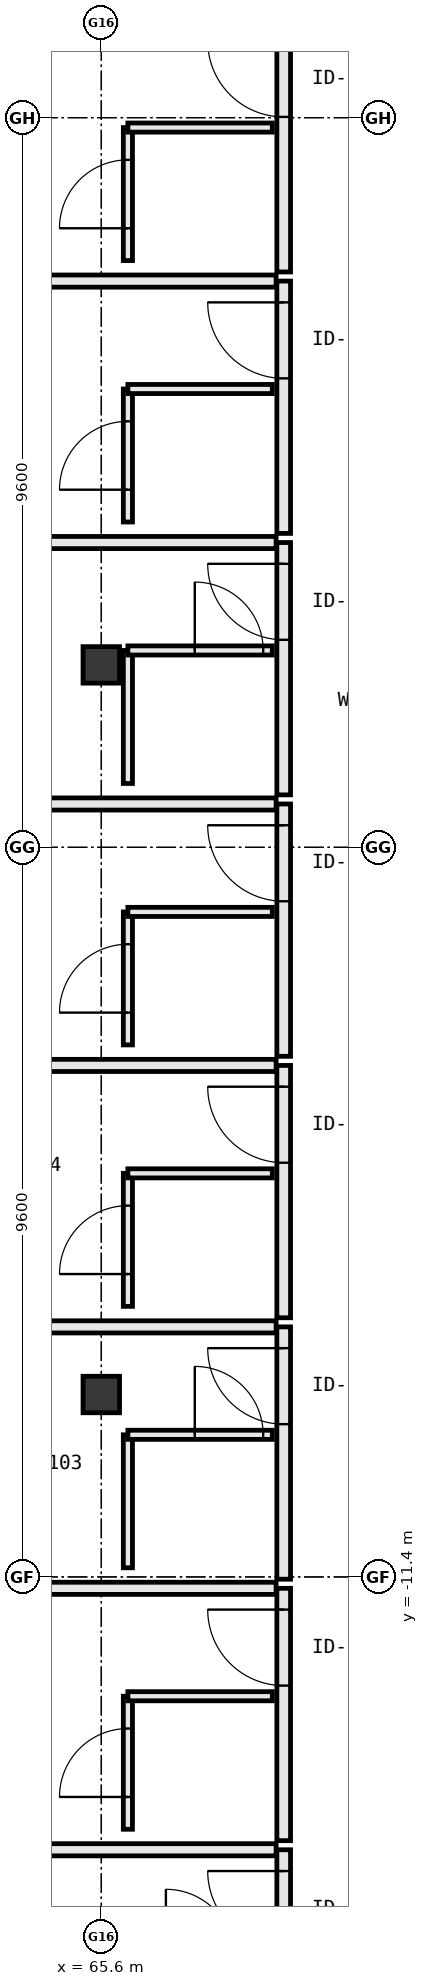
"""IFC4 building model, lengths in metres.
Left out: names, types, materials, properties, quantities, classifications, styles, units other than length and angle.
Written with IfcOpenShell. Run it as: python <this file> out.ifc"""

import sys

from ifc_helpers import new_model, si_unit, direction, frame, frame_2d, origin, origin_2d, place, context, subcontext, project, spatial, rectangle, extrude, element, fill, save


model = new_model("IFC4")
c1 = context("Model", 3, precision=1e-05, world=origin(), true_north=direction((0.0, 1.0)))
c2 = subcontext(c1, "Body", "Model", "MODEL_VIEW")
j1 = project(units=[si_unit("LENGTHUNIT", "METRE"), si_unit("PLANEANGLEUNIT", "RADIAN")], contexts=[c1])
p1 = place(None, origin())
s1 = spatial("IfcSite", under=j1, at=p1, CompositionType="ELEMENT")
p2 = place(p1, origin())
s2 = spatial("IfcBuilding", under=s1, at=p2, CompositionType="ELEMENT")
p3 = place(p2, frame((0.0, 0.0, 20.0)))
s3 = spatial("IfcBuildingStorey", under=s2, at=p3, CompositionType="ELEMENT", Elevation=20.0)
for number, where, z_axis, x_axis in (
    (1, (65.6, -9.0, 0.0), (0.0, 0.0, 1.0), (1.0, 0.0, 0.0)),
    (2, (65.6, 0.6, 0.0), (0.0, 0.0, 1.0), (1.0, 0.0, 0.0)),
):
    element("IfcColumn", number, at=place(p3, frame(where, z_axis=z_axis, x_axis=x_axis)), inside=s3, PredefinedType="COLUMN", context=c2, shape_type="SweptSolid", body=[
        extrude(rectangle(XDim=0.48, YDim=0.48, at=origin_2d()), origin(), (0.0, 0.0, 1.0), 3.8),
    ])
p4 = place(p3, frame((68.0, -18.31, 0.0), z_axis=(0.0, 0.0, 1.0), x_axis=(0.0, 1.0, 0.0)))
e3 = element("IfcWall", 3, at=p4, inside=s3, PredefinedType="PARTITIONING", context=c2, shape_type="SweptSolid", body=[
    extrude(rectangle(XDim=3.32, YDim=0.18, at=frame_2d((1.66, 0.0))), origin(), (0.0, 0.0, 1.0), 3.55),
])
p5 = place(p4, frame((2.04, 0.0, 0.0)))
e4 = element("IfcOpeningElement", 4, at=p5, cuts=e3, PredefinedType="OPENING", context=c2, shape_type="SweptSolid", body=[
    extrude(rectangle(XDim=1.0, YDim=2.2, at=frame_2d((0.5, 1.1))), frame((0.0, 0.102, 0.0), z_axis=(0.0, -1.0, 0.0), x_axis=(1.0, 0.0, 0.0)), (0.0, 0.0, 1.0), 0.204),
])
p6 = place(p3, frame((60.96, -14.99, 0.0), z_axis=(0.0, 0.0, 1.0), x_axis=(1.0, 0.0, 0.0)))
e5 = element("IfcWall", 5, at=p6, inside=s3, PredefinedType="PARTITIONING", context=c2, shape_type="SweptSolid", body=[
    extrude(rectangle(XDim=6.94, YDim=0.16, at=frame_2d((3.47, 0.0))), origin(), (0.0, 0.0, 1.0), 3.55),
])
p7 = place(p3, frame((68.0, -14.87, 0.0), z_axis=(0.0, 0.0, 1.0), x_axis=(0.0, 1.0, 0.0)))
e6 = element("IfcWall", 6, at=p7, inside=s3, PredefinedType="PARTITIONING", context=c2, shape_type="SweptSolid", body=[
    extrude(rectangle(XDim=3.32, YDim=0.18, at=frame_2d((1.66, 0.0))), origin(), (0.0, 0.0, 1.0), 3.55),
])
p8 = place(p7, frame((2.04, 0.0, 0.0)))
e7 = element("IfcOpeningElement", 7, at=p8, cuts=e6, PredefinedType="OPENING", context=c2, shape_type="SweptSolid", body=[
    extrude(rectangle(XDim=1.0, YDim=2.2, at=frame_2d((0.5, 1.1))), frame((0.0, 0.102, 0.0), z_axis=(0.0, -1.0, 0.0), x_axis=(1.0, 0.0, 0.0)), (0.0, 0.0, 1.0), 0.204),
])
p9 = place(p3, frame((60.96, -11.55, 0.0), z_axis=(0.0, 0.0, 1.0), x_axis=(1.0, 0.0, 0.0)))
e8 = element("IfcWall", 8, at=p9, inside=s3, PredefinedType="PARTITIONING", context=c2, shape_type="SweptSolid", body=[
    extrude(rectangle(XDim=6.94, YDim=0.16, at=frame_2d((3.47, 0.0))), origin(), (0.0, 0.0, 1.0), 3.55),
])
p10 = place(p3, frame((65.95, -14.72, 0.0), z_axis=(0.0, 0.0, 1.0), x_axis=(0.0, 1.0, 0.0)))
e9 = element("IfcWall", 9, at=p10, inside=s3, PredefinedType="PARTITIONING", context=c2, shape_type="SweptSolid", body=[
    extrude(rectangle(XDim=1.75, YDim=0.12, at=frame_2d((0.875, 0.0))), origin(), (0.0, 0.0, 1.0), 2.905),
])
p11 = place(p10, frame((0.425, 0.0, 0.0)))
e10 = element("IfcOpeningElement", 10, at=p11, cuts=e9, PredefinedType="OPENING", context=c2, shape_type="SweptSolid", body=[
    extrude(rectangle(XDim=0.9, YDim=2.15, at=frame_2d((0.45, 1.075))), frame((0.0, 0.072, 0.0), z_axis=(0.0, -1.0, 0.0), x_axis=(1.0, 0.0, 0.0)), (0.0, 0.0, 1.0), 0.144),
])
p12 = place(p3, frame((65.95, -12.97, 0.0), z_axis=(0.0, 0.0, 1.0), x_axis=(1.0, 0.0, 0.0)))
e11 = element("IfcWall", 11, at=p12, inside=s3, PredefinedType="PARTITIONING", context=c2, shape_type="SweptSolid", body=[
    extrude(rectangle(XDim=1.9, YDim=0.12, at=frame_2d((0.95, 0.0))), origin(), (0.0, 0.0, 1.0), 3.55),
])
p13 = place(p3, frame((68.0, -11.43, 0.0), z_axis=(0.0, 0.0, 1.0), x_axis=(0.0, 1.0, 0.0)))
e12 = element("IfcWall", 12, at=p13, inside=s3, PredefinedType="PARTITIONING", context=c2, shape_type="SweptSolid", body=[
    extrude(rectangle(XDim=3.32, YDim=0.18, at=frame_2d((1.66, 0.0))), origin(), (0.0, 0.0, 1.0), 3.55),
])
p14 = place(p13, frame((2.04, 0.0, 0.0)))
e13 = element("IfcOpeningElement", 13, at=p14, cuts=e12, PredefinedType="OPENING", context=c2, shape_type="SweptSolid", body=[
    extrude(rectangle(XDim=1.0, YDim=2.2, at=frame_2d((0.5, 1.1))), frame((0.0, 0.102, 0.0), z_axis=(0.0, -1.0, 0.0), x_axis=(1.0, 0.0, 0.0)), (0.0, 0.0, 1.0), 0.204),
])
p15 = place(p3, frame((60.96, -8.11, 0.0), z_axis=(0.0, 0.0, 1.0), x_axis=(1.0, 0.0, 0.0)))
e14 = element("IfcWall", 14, at=p15, inside=s3, PredefinedType="PARTITIONING", context=c2, shape_type="SweptSolid", body=[
    extrude(rectangle(XDim=6.94, YDim=0.16, at=frame_2d((3.47, 0.0))), origin(), (0.0, 0.0, 1.0), 3.55),
])
p16 = place(p3, frame((65.95, -11.28, 0.0), z_axis=(0.0, 0.0, 1.0), x_axis=(0.0, 1.0, 0.0)))
e15 = element("IfcWall", 15, at=p16, inside=s3, PredefinedType="PARTITIONING", context=c2, shape_type="SweptSolid", body=[
    extrude(rectangle(XDim=1.75, YDim=0.12, at=frame_2d((0.875, 0.0))), origin(), (0.0, 0.0, 1.0), 2.905),
])
p17 = place(p3, frame((65.95, -9.53, 0.0), z_axis=(0.0, 0.0, 1.0), x_axis=(1.0, 0.0, 0.0)))
e16 = element("IfcWall", 16, at=p17, inside=s3, PredefinedType="PARTITIONING", context=c2, shape_type="SweptSolid", body=[
    extrude(rectangle(XDim=1.9, YDim=0.12, at=frame_2d((0.95, 0.0))), origin(), (0.0, 0.0, 1.0), 3.55),
])
p18 = place(p17, frame((0.88, 0.0, 0.0)))
e17 = element("IfcOpeningElement", 17, at=p18, cuts=e16, PredefinedType="OPENING", context=c2, shape_type="SweptSolid", body=[
    extrude(rectangle(XDim=0.9, YDim=2.15, at=frame_2d((0.45, 1.075))), frame((0.0, 0.072, 0.0), z_axis=(0.0, -1.0, 0.0), x_axis=(1.0, 0.0, 0.0)), (0.0, 0.0, 1.0), 0.144),
])
p19 = place(p3, frame((68.0, -7.99, 0.0), z_axis=(0.0, 0.0, 1.0), x_axis=(0.0, 1.0, 0.0)))
e18 = element("IfcWall", 18, at=p19, inside=s3, PredefinedType="PARTITIONING", context=c2, shape_type="SweptSolid", body=[
    extrude(rectangle(XDim=3.32, YDim=0.18, at=frame_2d((1.66, 0.0))), origin(), (0.0, 0.0, 1.0), 3.55),
])
p20 = place(p19, frame((2.04, 0.0, 0.0)))
e19 = element("IfcOpeningElement", 19, at=p20, cuts=e18, PredefinedType="OPENING", context=c2, shape_type="SweptSolid", body=[
    extrude(rectangle(XDim=1.0, YDim=2.2, at=frame_2d((0.5, 1.1))), frame((0.0, 0.102, 0.0), z_axis=(0.0, -1.0, 0.0), x_axis=(1.0, 0.0, 0.0)), (0.0, 0.0, 1.0), 0.204),
])
p21 = place(p3, frame((60.96, -4.67, 0.0), z_axis=(0.0, 0.0, 1.0), x_axis=(1.0, 0.0, 0.0)))
e20 = element("IfcWall", 20, at=p21, inside=s3, PredefinedType="PARTITIONING", context=c2, shape_type="SweptSolid", body=[
    extrude(rectangle(XDim=6.94, YDim=0.16, at=frame_2d((3.47, 0.0))), origin(), (0.0, 0.0, 1.0), 3.55),
])
p22 = place(p3, frame((65.95, -7.84, 0.0), z_axis=(0.0, 0.0, 1.0), x_axis=(0.0, 1.0, 0.0)))
e21 = element("IfcWall", 21, at=p22, inside=s3, PredefinedType="PARTITIONING", context=c2, shape_type="SweptSolid", body=[
    extrude(rectangle(XDim=1.75, YDim=0.12, at=frame_2d((0.875, 0.0))), origin(), (0.0, 0.0, 1.0), 2.905),
])
p23 = place(p22, frame((0.425, 0.0, 0.0)))
e22 = element("IfcOpeningElement", 22, at=p23, cuts=e21, PredefinedType="OPENING", context=c2, shape_type="SweptSolid", body=[
    extrude(rectangle(XDim=0.9, YDim=2.15, at=frame_2d((0.45, 1.075))), frame((0.0, 0.072, 0.0), z_axis=(0.0, -1.0, 0.0), x_axis=(1.0, 0.0, 0.0)), (0.0, 0.0, 1.0), 0.144),
])
p24 = place(p3, frame((65.95, -6.09, 0.0), z_axis=(0.0, 0.0, 1.0), x_axis=(1.0, 0.0, 0.0)))
e23 = element("IfcWall", 23, at=p24, inside=s3, PredefinedType="PARTITIONING", context=c2, shape_type="SweptSolid", body=[
    extrude(rectangle(XDim=1.9, YDim=0.12, at=frame_2d((0.95, 0.0))), origin(), (0.0, 0.0, 1.0), 3.55),
])
p25 = place(p3, frame((68.0, -4.55, 0.0), z_axis=(0.0, 0.0, 1.0), x_axis=(0.0, 1.0, 0.0)))
e24 = element("IfcWall", 24, at=p25, inside=s3, PredefinedType="PARTITIONING", context=c2, shape_type="SweptSolid", body=[
    extrude(rectangle(XDim=3.32, YDim=0.18, at=frame_2d((1.66, 0.0))), origin(), (0.0, 0.0, 1.0), 3.55),
])
p26 = place(p25, frame((2.04, 0.0, 0.0)))
e25 = element("IfcOpeningElement", 25, at=p26, cuts=e24, PredefinedType="OPENING", context=c2, shape_type="SweptSolid", body=[
    extrude(rectangle(XDim=1.0, YDim=2.2, at=frame_2d((0.5, 1.1))), frame((0.0, 0.102, 0.0), z_axis=(0.0, -1.0, 0.0), x_axis=(1.0, 0.0, 0.0)), (0.0, 0.0, 1.0), 0.204),
])
p27 = place(p3, frame((60.96, -1.23, 0.0), z_axis=(0.0, 0.0, 1.0), x_axis=(1.0, 0.0, 0.0)))
e26 = element("IfcWall", 26, at=p27, inside=s3, PredefinedType="PARTITIONING", context=c2, shape_type="SweptSolid", body=[
    extrude(rectangle(XDim=6.94, YDim=0.16, at=frame_2d((3.47, 0.0))), origin(), (0.0, 0.0, 1.0), 3.55),
])
p28 = place(p3, frame((65.95, -4.4, 0.0), z_axis=(0.0, 0.0, 1.0), x_axis=(0.0, 1.0, 0.0)))
e27 = element("IfcWall", 27, at=p28, inside=s3, PredefinedType="PARTITIONING", context=c2, shape_type="SweptSolid", body=[
    extrude(rectangle(XDim=1.75, YDim=0.12, at=frame_2d((0.875, 0.0))), origin(), (0.0, 0.0, 1.0), 2.905),
])
p29 = place(p28, frame((0.425, 0.0, 0.0)))
e28 = element("IfcOpeningElement", 28, at=p29, cuts=e27, PredefinedType="OPENING", context=c2, shape_type="SweptSolid", body=[
    extrude(rectangle(XDim=0.9, YDim=2.15, at=frame_2d((0.45, 1.075))), frame((0.0, 0.072, 0.0), z_axis=(0.0, -1.0, 0.0), x_axis=(1.0, 0.0, 0.0)), (0.0, 0.0, 1.0), 0.144),
])
p30 = place(p3, frame((65.95, -2.65, 0.0), z_axis=(0.0, 0.0, 1.0), x_axis=(1.0, 0.0, 0.0)))
e29 = element("IfcWall", 29, at=p30, inside=s3, PredefinedType="PARTITIONING", context=c2, shape_type="SweptSolid", body=[
    extrude(rectangle(XDim=1.9, YDim=0.12, at=frame_2d((0.95, 0.0))), origin(), (0.0, 0.0, 1.0), 3.55),
])
p31 = place(p3, frame((68.0, -1.11, 0.0), z_axis=(0.0, 0.0, 1.0), x_axis=(0.0, 1.0, 0.0)))
e30 = element("IfcWall", 30, at=p31, inside=s3, PredefinedType="PARTITIONING", context=c2, shape_type="SweptSolid", body=[
    extrude(rectangle(XDim=3.32, YDim=0.18, at=frame_2d((1.66, 0.0))), origin(), (0.0, 0.0, 1.0), 3.55),
])
p32 = place(p31, frame((2.04, 0.0, 0.0)))
e31 = element("IfcOpeningElement", 31, at=p32, cuts=e30, PredefinedType="OPENING", context=c2, shape_type="SweptSolid", body=[
    extrude(rectangle(XDim=1.0, YDim=2.2, at=frame_2d((0.5, 1.1))), frame((0.0, 0.102, 0.0), z_axis=(0.0, -1.0, 0.0), x_axis=(1.0, 0.0, 0.0)), (0.0, 0.0, 1.0), 0.204),
])
p33 = place(p3, frame((60.96, 2.21, 0.0), z_axis=(0.0, 0.0, 1.0), x_axis=(1.0, 0.0, 0.0)))
e32 = element("IfcWall", 32, at=p33, inside=s3, PredefinedType="PARTITIONING", context=c2, shape_type="SweptSolid", body=[
    extrude(rectangle(XDim=6.94, YDim=0.16, at=frame_2d((3.47, 0.0))), origin(), (0.0, 0.0, 1.0), 3.55),
])
p34 = place(p3, frame((65.95, -0.96, 0.0), z_axis=(0.0, 0.0, 1.0), x_axis=(0.0, 1.0, 0.0)))
e33 = element("IfcWall", 33, at=p34, inside=s3, PredefinedType="PARTITIONING", context=c2, shape_type="SweptSolid", body=[
    extrude(rectangle(XDim=1.75, YDim=0.12, at=frame_2d((0.875, 0.0))), origin(), (0.0, 0.0, 1.0), 2.905),
])
p35 = place(p3, frame((65.95, 0.79, 0.0), z_axis=(0.0, 0.0, 1.0), x_axis=(1.0, 0.0, 0.0)))
e34 = element("IfcWall", 34, at=p35, inside=s3, PredefinedType="PARTITIONING", context=c2, shape_type="SweptSolid", body=[
    extrude(rectangle(XDim=1.9, YDim=0.12, at=frame_2d((0.95, 0.0))), origin(), (0.0, 0.0, 1.0), 2.905),
])
p36 = place(p35, frame((0.88, 0.0, 0.0)))
e35 = element("IfcOpeningElement", 35, at=p36, cuts=e34, PredefinedType="OPENING", context=c2, shape_type="SweptSolid", body=[
    extrude(rectangle(XDim=0.9, YDim=2.15, at=frame_2d((0.45, 1.075))), frame((0.0, 0.072, 0.0), z_axis=(0.0, -1.0, 0.0), x_axis=(1.0, 0.0, 0.0)), (0.0, 0.0, 1.0), 0.144),
])
p37 = place(p3, frame((68.0, 2.33, 0.0), z_axis=(0.0, 0.0, 1.0), x_axis=(0.0, 1.0, 0.0)))
e36 = element("IfcWall", 36, at=p37, inside=s3, PredefinedType="PARTITIONING", context=c2, shape_type="SweptSolid", body=[
    extrude(rectangle(XDim=3.32, YDim=0.18, at=frame_2d((1.66, 0.0))), origin(), (0.0, 0.0, 1.0), 3.55),
])
p38 = place(p37, frame((2.04, 0.0, 0.0)))
e37 = element("IfcOpeningElement", 37, at=p38, cuts=e36, PredefinedType="OPENING", context=c2, shape_type="SweptSolid", body=[
    extrude(rectangle(XDim=1.0, YDim=2.2, at=frame_2d((0.5, 1.1))), frame((0.0, 0.102, 0.0), z_axis=(0.0, -1.0, 0.0), x_axis=(1.0, 0.0, 0.0)), (0.0, 0.0, 1.0), 0.204),
])
p39 = place(p3, frame((60.96, 5.65, 0.0), z_axis=(0.0, 0.0, 1.0), x_axis=(1.0, 0.0, 0.0)))
e38 = element("IfcWall", 38, at=p39, inside=s3, PredefinedType="PARTITIONING", context=c2, shape_type="SweptSolid", body=[
    extrude(rectangle(XDim=6.94, YDim=0.16, at=frame_2d((3.47, 0.0))), origin(), (0.0, 0.0, 1.0), 3.55),
])
p40 = place(p3, frame((65.95, 2.48, 0.0), z_axis=(0.0, 0.0, 1.0), x_axis=(0.0, 1.0, 0.0)))
e39 = element("IfcWall", 39, at=p40, inside=s3, PredefinedType="PARTITIONING", context=c2, shape_type="SweptSolid", body=[
    extrude(rectangle(XDim=1.75, YDim=0.12, at=frame_2d((0.875, 0.0))), origin(), (0.0, 0.0, 1.0), 2.905),
])
p41 = place(p40, frame((0.425, 0.0, 0.0)))
e40 = element("IfcOpeningElement", 40, at=p41, cuts=e39, PredefinedType="OPENING", context=c2, shape_type="SweptSolid", body=[
    extrude(rectangle(XDim=0.9, YDim=2.15, at=frame_2d((0.45, 1.075))), frame((0.0, 0.072, 0.0), z_axis=(0.0, -1.0, 0.0), x_axis=(1.0, 0.0, 0.0)), (0.0, 0.0, 1.0), 0.144),
])
p42 = place(p3, frame((65.95, 4.23, 0.0), z_axis=(0.0, 0.0, 1.0), x_axis=(1.0, 0.0, 0.0)))
e41 = element("IfcWall", 41, at=p42, inside=s3, PredefinedType="PARTITIONING", context=c2, shape_type="SweptSolid", body=[
    extrude(rectangle(XDim=1.9, YDim=0.12, at=frame_2d((0.95, 0.0))), origin(), (0.0, 0.0, 1.0), 3.55),
])
p43 = place(p3, frame((68.0, 5.77, 0.0), z_axis=(0.0, 0.0, 1.0), x_axis=(0.0, 1.0, 0.0)))
e42 = element("IfcWall", 42, at=p43, inside=s3, PredefinedType="PARTITIONING", context=c2, shape_type="SweptSolid", body=[
    extrude(rectangle(XDim=3.32, YDim=0.18, at=frame_2d((1.66, 0.0))), origin(), (0.0, 0.0, 1.0), 3.55),
])
p44 = place(p43, frame((2.04, 0.0, 0.0)))
e43 = element("IfcOpeningElement", 43, at=p44, cuts=e42, PredefinedType="OPENING", context=c2, shape_type="SweptSolid", body=[
    extrude(rectangle(XDim=1.0, YDim=2.2, at=frame_2d((0.5, 1.1))), frame((0.0, 0.102, 0.0), z_axis=(0.0, -1.0, 0.0), x_axis=(1.0, 0.0, 0.0)), (0.0, 0.0, 1.0), 0.204),
])
p45 = place(p3, frame((65.95, 5.92, 0.0), z_axis=(0.0, 0.0, 1.0), x_axis=(0.0, 1.0, 0.0)))
e44 = element("IfcWall", 44, at=p45, inside=s3, PredefinedType="PARTITIONING", context=c2, shape_type="SweptSolid", body=[
    extrude(rectangle(XDim=1.75, YDim=0.12, at=frame_2d((0.875, 0.0))), origin(), (0.0, 0.0, 1.0), 2.905),
])
p46 = place(p45, frame((0.425, 0.0, 0.0)))
e45 = element("IfcOpeningElement", 45, at=p46, cuts=e44, PredefinedType="OPENING", context=c2, shape_type="SweptSolid", body=[
    extrude(rectangle(XDim=0.9, YDim=2.15, at=frame_2d((0.45, 1.075))), frame((0.0, 0.072, 0.0), z_axis=(0.0, -1.0, 0.0), x_axis=(1.0, 0.0, 0.0)), (0.0, 0.0, 1.0), 0.144),
])
p47 = place(p3, frame((65.95, 7.67, 0.0), z_axis=(0.0, 0.0, 1.0), x_axis=(1.0, 0.0, 0.0)))
e46 = element("IfcWall", 46, at=p47, inside=s3, PredefinedType="PARTITIONING", context=c2, shape_type="SweptSolid", body=[
    extrude(rectangle(XDim=1.9, YDim=0.12, at=frame_2d((0.95, 0.0))), origin(), (0.0, 0.0, 1.0), 3.55),
])
p48 = place(p5, origin())
e47 = element("IfcDoor", 47, at=p48, inside=s3, OperationType="SINGLE_SWING_RIGHT", PredefinedType="DOOR", context=c2, shape_type="SweptSolid", body=[
    extrude(rectangle(XDim=1.0, YDim=2.2, at=frame_2d((0.5, 1.1))), frame((0.0, 0.025, 0.0), z_axis=(0.0, -1.0, 0.0), x_axis=(1.0, 0.0, 0.0)), (0.0, 0.0, 1.0), 0.05),
])
fill(e4, e47)
p49 = place(p8, origin())
e48 = element("IfcDoor", 48, at=p49, inside=s3, OperationType="SINGLE_SWING_RIGHT", PredefinedType="DOOR", context=c2, shape_type="SweptSolid", body=[
    extrude(rectangle(XDim=1.0, YDim=2.2, at=frame_2d((0.5, 1.1))), frame((0.0, 0.025, 0.0), z_axis=(0.0, -1.0, 0.0), x_axis=(1.0, 0.0, 0.0)), (0.0, 0.0, 1.0), 0.05),
])
fill(e7, e48)
p50 = place(p11, origin())
e49 = element("IfcDoor", 49, at=p50, inside=s3, OperationType="SINGLE_SWING_LEFT", PredefinedType="DOOR", context=c2, shape_type="SweptSolid", body=[
    extrude(rectangle(XDim=0.9, YDim=2.15, at=frame_2d((0.45, 1.075))), frame((0.0, 0.025, 0.0), z_axis=(0.0, -1.0, 0.0), x_axis=(1.0, 0.0, 0.0)), (0.0, 0.0, 1.0), 0.05),
])
fill(e10, e49)
p51 = place(p14, origin())
e50 = element("IfcDoor", 50, at=p51, inside=s3, OperationType="SINGLE_SWING_RIGHT", PredefinedType="DOOR", context=c2, shape_type="SweptSolid", body=[
    extrude(rectangle(XDim=1.0, YDim=2.2, at=frame_2d((0.5, 1.1))), frame((0.0, 0.025, 0.0), z_axis=(0.0, -1.0, 0.0), x_axis=(1.0, 0.0, 0.0)), (0.0, 0.0, 1.0), 0.05),
])
fill(e13, e50)
p52 = place(p18, origin())
e51 = element("IfcDoor", 51, at=p52, inside=s3, OperationType="SINGLE_SWING_LEFT", PredefinedType="DOOR", context=c2, shape_type="SweptSolid", body=[
    extrude(rectangle(XDim=0.9, YDim=2.15, at=frame_2d((0.45, 1.075))), frame((0.0, 0.025, 0.0), z_axis=(0.0, -1.0, 0.0), x_axis=(1.0, 0.0, 0.0)), (0.0, 0.0, 1.0), 0.05),
])
fill(e17, e51)
p53 = place(p20, origin())
e52 = element("IfcDoor", 52, at=p53, inside=s3, OperationType="SINGLE_SWING_RIGHT", PredefinedType="DOOR", context=c2, shape_type="SweptSolid", body=[
    extrude(rectangle(XDim=1.0, YDim=2.2, at=frame_2d((0.5, 1.1))), frame((0.0, 0.025, 0.0), z_axis=(0.0, -1.0, 0.0), x_axis=(1.0, 0.0, 0.0)), (0.0, 0.0, 1.0), 0.05),
])
fill(e19, e52)
p54 = place(p23, origin())
e53 = element("IfcDoor", 53, at=p54, inside=s3, OperationType="SINGLE_SWING_LEFT", PredefinedType="DOOR", context=c2, shape_type="SweptSolid", body=[
    extrude(rectangle(XDim=0.9, YDim=2.15, at=frame_2d((0.45, 1.075))), frame((0.0, 0.025, 0.0), z_axis=(0.0, -1.0, 0.0), x_axis=(1.0, 0.0, 0.0)), (0.0, 0.0, 1.0), 0.05),
])
fill(e22, e53)
p55 = place(p26, origin())
e54 = element("IfcDoor", 54, at=p55, inside=s3, OperationType="SINGLE_SWING_RIGHT", PredefinedType="DOOR", context=c2, shape_type="SweptSolid", body=[
    extrude(rectangle(XDim=1.0, YDim=2.2, at=frame_2d((0.5, 1.1))), frame((0.0, 0.025, 0.0), z_axis=(0.0, -1.0, 0.0), x_axis=(1.0, 0.0, 0.0)), (0.0, 0.0, 1.0), 0.05),
])
fill(e25, e54)
p56 = place(p29, origin())
e55 = element("IfcDoor", 55, at=p56, inside=s3, OperationType="SINGLE_SWING_LEFT", PredefinedType="DOOR", context=c2, shape_type="SweptSolid", body=[
    extrude(rectangle(XDim=0.9, YDim=2.15, at=frame_2d((0.45, 1.075))), frame((0.0, 0.025, 0.0), z_axis=(0.0, -1.0, 0.0), x_axis=(1.0, 0.0, 0.0)), (0.0, 0.0, 1.0), 0.05),
])
fill(e28, e55)
p57 = place(p32, origin())
e56 = element("IfcDoor", 56, at=p57, inside=s3, OperationType="SINGLE_SWING_RIGHT", PredefinedType="DOOR", context=c2, shape_type="SweptSolid", body=[
    extrude(rectangle(XDim=1.0, YDim=2.2, at=frame_2d((0.5, 1.1))), frame((0.0, 0.025, 0.0), z_axis=(0.0, -1.0, 0.0), x_axis=(1.0, 0.0, 0.0)), (0.0, 0.0, 1.0), 0.05),
])
fill(e31, e56)
p58 = place(p36, origin())
e57 = element("IfcDoor", 57, at=p58, inside=s3, OperationType="SINGLE_SWING_LEFT", PredefinedType="DOOR", context=c2, shape_type="SweptSolid", body=[
    extrude(rectangle(XDim=0.9, YDim=2.15, at=frame_2d((0.45, 1.075))), frame((0.0, 0.025, 0.0), z_axis=(0.0, -1.0, 0.0), x_axis=(1.0, 0.0, 0.0)), (0.0, 0.0, 1.0), 0.05),
])
fill(e35, e57)
p59 = place(p38, origin())
e58 = element("IfcDoor", 58, at=p59, inside=s3, OperationType="SINGLE_SWING_RIGHT", PredefinedType="DOOR", context=c2, shape_type="SweptSolid", body=[
    extrude(rectangle(XDim=1.0, YDim=2.2, at=frame_2d((0.5, 1.1))), frame((0.0, 0.025, 0.0), z_axis=(0.0, -1.0, 0.0), x_axis=(1.0, 0.0, 0.0)), (0.0, 0.0, 1.0), 0.05),
])
fill(e37, e58)
p60 = place(p41, origin())
e59 = element("IfcDoor", 59, at=p60, inside=s3, OperationType="SINGLE_SWING_LEFT", PredefinedType="DOOR", context=c2, shape_type="SweptSolid", body=[
    extrude(rectangle(XDim=0.9, YDim=2.15, at=frame_2d((0.45, 1.075))), frame((0.0, 0.025, 0.0), z_axis=(0.0, -1.0, 0.0), x_axis=(1.0, 0.0, 0.0)), (0.0, 0.0, 1.0), 0.05),
])
fill(e40, e59)
p61 = place(p44, origin())
e60 = element("IfcDoor", 60, at=p61, inside=s3, OperationType="SINGLE_SWING_RIGHT", PredefinedType="DOOR", context=c2, shape_type="SweptSolid", body=[
    extrude(rectangle(XDim=1.0, YDim=2.2, at=frame_2d((0.5, 1.1))), frame((0.0, 0.025, 0.0), z_axis=(0.0, -1.0, 0.0), x_axis=(1.0, 0.0, 0.0)), (0.0, 0.0, 1.0), 0.05),
])
fill(e43, e60)
p62 = place(p46, origin())
e61 = element("IfcDoor", 61, at=p62, inside=s3, OperationType="SINGLE_SWING_LEFT", PredefinedType="DOOR", context=c2, shape_type="SweptSolid", body=[
    extrude(rectangle(XDim=0.9, YDim=2.15, at=frame_2d((0.45, 1.075))), frame((0.0, 0.025, 0.0), z_axis=(0.0, -1.0, 0.0), x_axis=(1.0, 0.0, 0.0)), (0.0, 0.0, 1.0), 0.05),
])
fill(e45, e61)
save(model, sys.argv[1])
